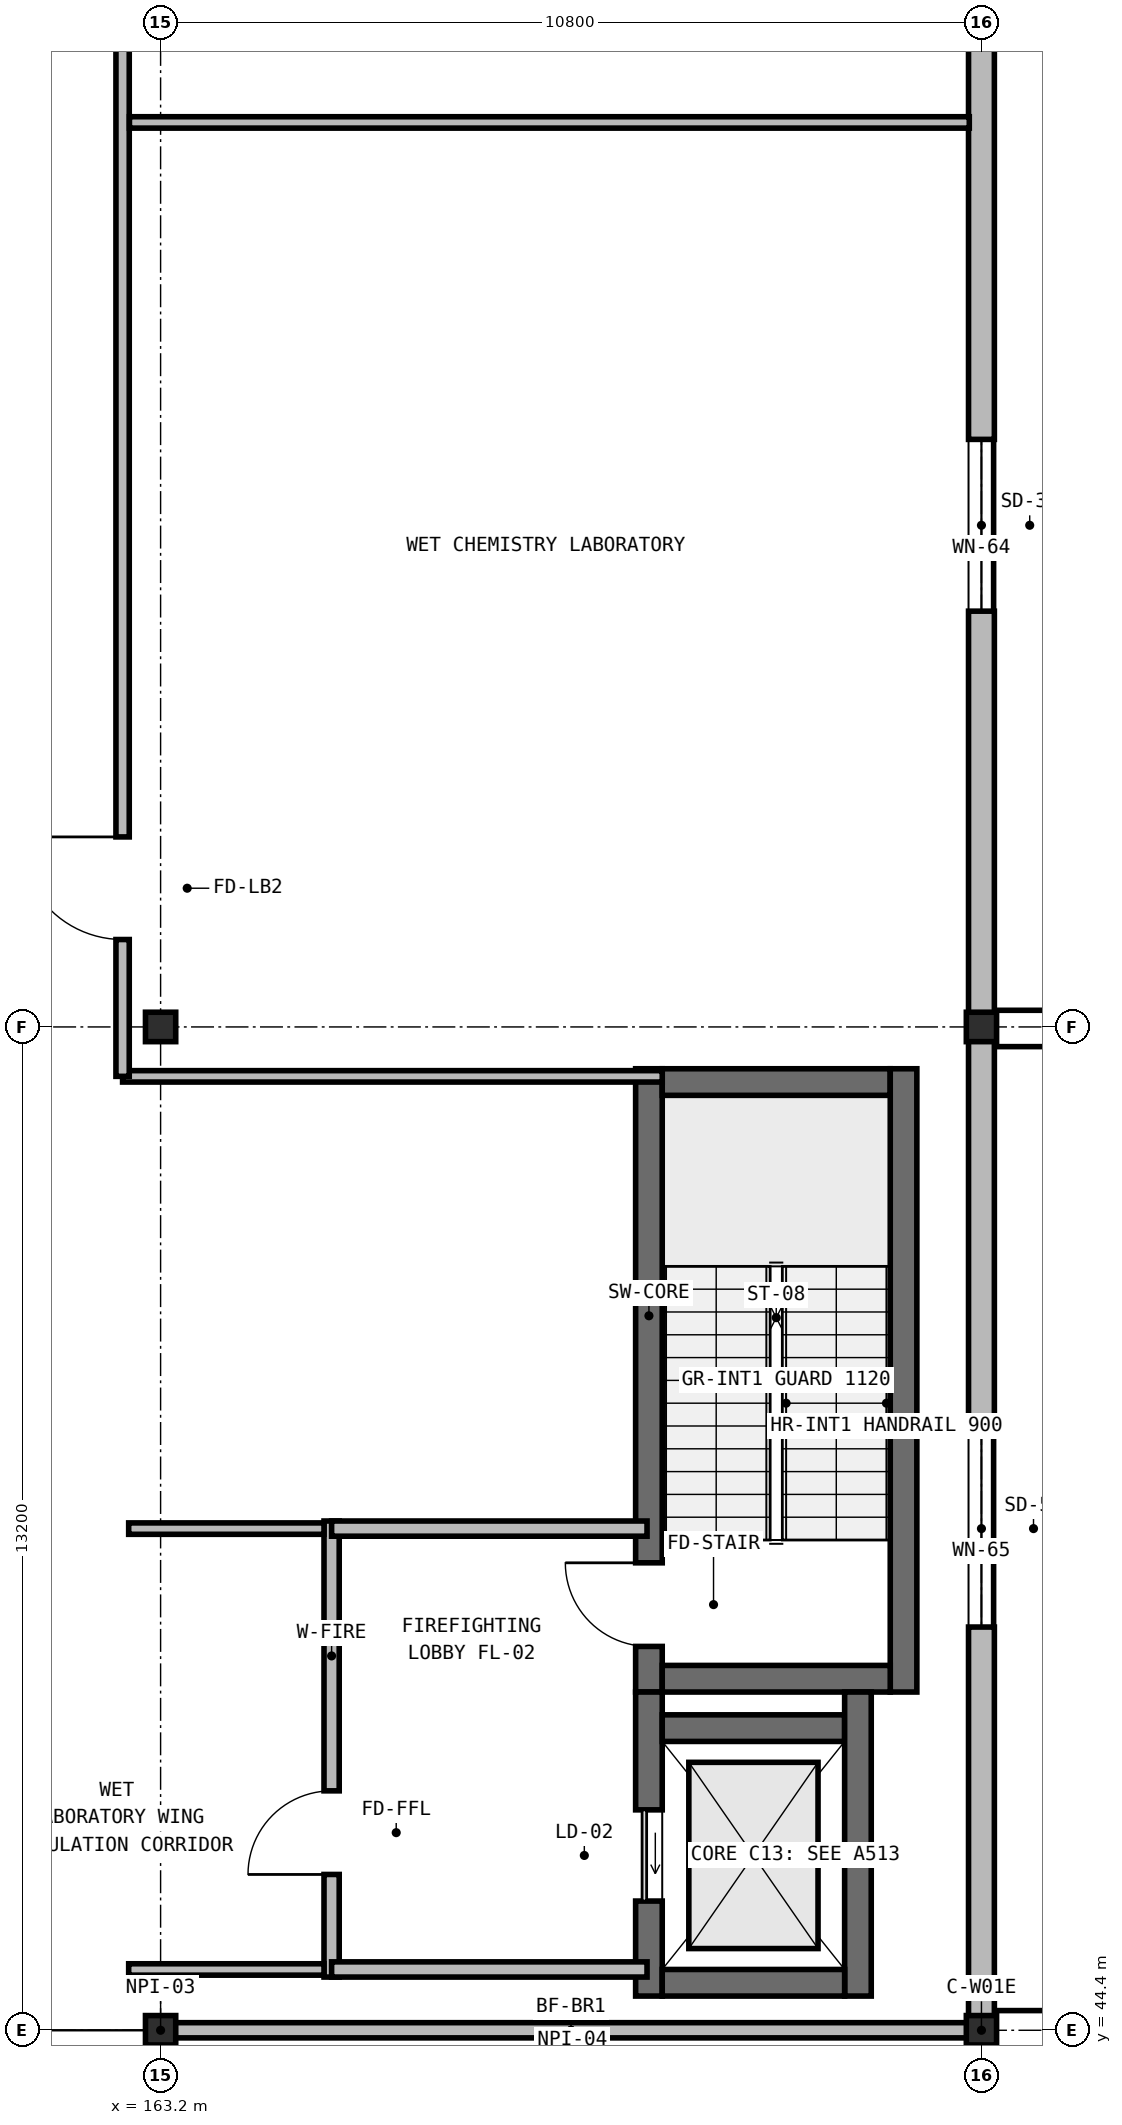
"""IFC4 building model, lengths in metres.
Left out: names, types, materials, properties, quantities, classifications, styles, units other than length and angle.
Written with IfcOpenShell. Run it as: python <this file> out.ifc"""

import sys

from ifc_helpers import new_model, si_unit, direction, frame, frame_2d, origin, origin_2d, place, context, subcontext, project, spatial, rectangle, i_section, extrude, element, fill, save


model = new_model("IFC4")
c1 = context("Model", 3, precision=1e-05, world=origin(), true_north=direction((0.0, 1.0)))
c2 = subcontext(c1, "Body", "Model", "MODEL_VIEW")
j1 = project(units=[si_unit("LENGTHUNIT", "METRE"), si_unit("PLANEANGLEUNIT", "RADIAN")], contexts=[c1])
p1 = place(None, origin())
s1 = spatial("IfcSite", under=j1, at=p1, CompositionType="ELEMENT")
p2 = place(p1, origin())
s2 = spatial("IfcBuilding", under=s1, at=p2, CompositionType="ELEMENT")
p3 = place(p2, frame((0.0, 0.0, 5.25)))
s3 = spatial("IfcBuildingStorey", under=s2, at=p3, CompositionType="ELEMENT", Elevation=5.25)
p4 = place(p3, frame((169.625, 48.85, 0.0), z_axis=(0.0, 0.0, 1.0), x_axis=(0.0, 1.0, 0.0)))
e1 = element("IfcWall", 1, at=p4, inside=s3, PredefinedType="SHEAR", context=c2, shape_type="SweptSolid", body=[
    extrude(rectangle(XDim=8.2, YDim=0.35, at=frame_2d((4.1, 0.0))), origin(), (0.0, 0.0, 1.0), 4.55),
])
p5 = place(p4, frame((0.6, 0.0, 0.0)))
e2 = element("IfcOpeningElement", 2, at=p5, cuts=e1, PredefinedType="OPENING", context=c2, shape_type="SweptSolid", body=[
    extrude(rectangle(XDim=1.1, YDim=2.15, at=frame_2d((0.55, 1.075))), frame((0.0, 0.185, 0.0), z_axis=(0.0, -1.0, 0.0), x_axis=(1.0, 0.0, 0.0)), (0.0, 0.0, 1.0), 0.37),
])
p6 = place(p3, frame((169.8, 56.875, 0.0), z_axis=(0.0, 0.0, 1.0), x_axis=(1.0, 0.0, 0.0)))
e3 = element("IfcWall", 3, at=p6, inside=s3, PredefinedType="SHEAR", context=c2, shape_type="SweptSolid", body=[
    extrude(rectangle(XDim=3.0, YDim=0.35, at=frame_2d((1.5, 0.0))), origin(), (0.0, 0.0, 1.0), 4.55),
])
p7 = place(p3, frame((172.975, 57.05, 0.0), z_axis=(0.0, 0.0, 1.0), x_axis=(0.0, -1.0, 0.0)))
e4 = element("IfcWall", 4, at=p7, inside=s3, PredefinedType="SHEAR", context=c2, shape_type="SweptSolid", body=[
    extrude(rectangle(XDim=8.2, YDim=0.35, at=frame_2d((4.1, 0.0))), origin(), (0.0, 0.0, 1.0), 4.55),
])
p8 = place(p3, frame((172.8, 49.025, 0.0), z_axis=(0.0, 0.0, 1.0), x_axis=(-1.0, 0.0, 0.0)))
e5 = element("IfcWall", 5, at=p8, inside=s3, PredefinedType="SHEAR", context=c2, shape_type="SweptSolid", body=[
    extrude(rectangle(XDim=3.0, YDim=0.35, at=frame_2d((1.5, 0.0))), origin(), (0.0, 0.0, 1.0), 4.55),
])
p9 = place(p3, frame((169.625, 44.85, 0.0), z_axis=(0.0, 0.0, 1.0), x_axis=(0.0, 1.0, 0.0)))
e6 = element("IfcWall", 6, at=p9, inside=s3, PredefinedType="SHEAR", context=c2, shape_type="SweptSolid", body=[
    extrude(rectangle(XDim=4.0, YDim=0.35, at=frame_2d((2.0, 0.0))), origin(), (0.0, 0.0, 1.0), 4.55),
])
p10 = place(p9, frame((1.25, 0.0, 0.0)))
e7 = element("IfcOpeningElement", 7, at=p10, cuts=e6, PredefinedType="OPENING", context=c2, shape_type="SweptSolid", body=[
    extrude(rectangle(XDim=1.2, YDim=2.15, at=frame_2d((0.6, 1.075))), frame((0.0, 0.185, 0.0), z_axis=(0.0, -1.0, 0.0), x_axis=(1.0, 0.0, 0.0)), (0.0, 0.0, 1.0), 0.37),
])
p11 = place(p3, frame((169.8, 48.375, 0.0), z_axis=(0.0, 0.0, 1.0), x_axis=(1.0, 0.0, 0.0)))
e8 = element("IfcWall", 8, at=p11, inside=s3, PredefinedType="SHEAR", context=c2, shape_type="SweptSolid", body=[
    extrude(rectangle(XDim=2.4, YDim=0.35, at=frame_2d((1.2, 0.0))), origin(), (0.0, 0.0, 1.0), 4.55),
])
p12 = place(p3, frame((172.375, 48.85, 0.0), z_axis=(0.0, 0.0, 1.0), x_axis=(0.0, -1.0, 0.0)))
e9 = element("IfcWall", 9, at=p12, inside=s3, PredefinedType="SHEAR", context=c2, shape_type="SweptSolid", body=[
    extrude(rectangle(XDim=4.0, YDim=0.35, at=frame_2d((2.0, 0.0))), origin(), (0.0, 0.0, 1.0), 4.55),
])
p13 = place(p3, frame((172.2, 45.025, 0.0), z_axis=(0.0, 0.0, 1.0), x_axis=(-1.0, 0.0, 0.0)))
e10 = element("IfcWall", 10, at=p13, inside=s3, PredefinedType="SHEAR", context=c2, shape_type="SweptSolid", body=[
    extrude(rectangle(XDim=2.4, YDim=0.35, at=frame_2d((1.2, 0.0))), origin(), (0.0, 0.0, 1.0), 4.55),
])
for number, where, z_axis, x_axis in (
    (11, (163.2, 44.4, 0.0), (0.0, 0.0, 1.0), (1.0, 0.0, 0.0)),
    (12, (163.2, 57.6, 0.0), (0.0, 0.0, 1.0), (1.0, 0.0, 0.0)),
    (13, (174.0, 44.4, 0.0), (0.0, 0.0, 1.0), (1.0, 0.0, 0.0)),
    (14, (174.0, 57.6, 0.0), (0.0, 0.0, 1.0), (1.0, 0.0, 0.0)),
):
    element("IfcColumn", number, at=place(p3, frame(where, z_axis=z_axis, x_axis=x_axis)), inside=s3, PredefinedType="COLUMN", context=c2, shape_type="SweptSolid", body=[
        extrude(i_section(OverallWidth=0.398, OverallDepth=0.387, WebThickness=0.024, FlangeThickness=0.039, at=origin_2d()), origin(), (0.0, 0.0, 1.0), 4.55),
    ])
p14 = place(p3, frame((174.0, 70.796, 0.0), z_axis=(0.0, 0.0, 1.0), x_axis=(0.0, -1.0, 0.0)))
e15 = element("IfcWall", 15, at=p14, inside=s3, PredefinedType="SOLIDWALL", context=c2, shape_type="SweptSolid", body=[
    extrude(rectangle(XDim=13.192, YDim=0.34, at=frame_2d((6.596, 0.0))), origin(), (0.0, 0.0, 1.0), 3.815),
])
p15 = place(p14, frame((5.466, 0.0, 0.95)))
e16 = element("IfcOpeningElement", 16, at=p15, cuts=e15, PredefinedType="OPENING", context=c2, shape_type="SweptSolid", body=[
    extrude(rectangle(XDim=2.26, YDim=1.56, at=frame_2d((1.13, 0.78))), frame((0.0, 0.18, 0.0), z_axis=(0.0, -1.0, 0.0), x_axis=(1.0, 0.0, 0.0)), (0.0, 0.0, 1.0), 0.36),
])
p16 = place(p3, frame((174.0, 57.596, 0.0), z_axis=(0.0, 0.0, 1.0), x_axis=(0.0, -1.0, 0.0)))
e17 = element("IfcWall", 17, at=p16, inside=s3, PredefinedType="SOLIDWALL", context=c2, shape_type="SweptSolid", body=[
    extrude(rectangle(XDim=13.192, YDim=0.34, at=frame_2d((6.596, 0.0))), origin(), (0.0, 0.0, 1.0), 3.815),
])
p17 = place(p16, frame((5.301, 0.0, 0.95)))
e18 = element("IfcOpeningElement", 18, at=p17, cuts=e17, PredefinedType="OPENING", context=c2, shape_type="SweptSolid", body=[
    extrude(rectangle(XDim=2.59, YDim=1.48, at=frame_2d((1.295, 0.74))), frame((0.0, 0.18, 0.0), z_axis=(0.0, -1.0, 0.0), x_axis=(1.0, 0.0, 0.0)), (0.0, 0.0, 1.0), 0.36),
])
p18 = place(p3, frame((174.0, 44.396, 0.0), z_axis=(0.0, 0.0, 1.0), x_axis=(0.0, -1.0, 0.0)))
e19 = element("IfcWall", 19, at=p18, inside=s3, PredefinedType="SOLIDWALL", context=c2, shape_type="SweptSolid", body=[
    extrude(rectangle(XDim=9.592, YDim=0.34, at=frame_2d((4.796, 0.0))), origin(), (0.0, 0.0, 1.0), 3.884),
])
p19 = place(p18, frame((4.216, 0.0, 0.95)))
e20 = element("IfcOpeningElement", 20, at=p19, cuts=e19, PredefinedType="OPENING", context=c2, shape_type="SweptSolid", body=[
    extrude(rectangle(XDim=1.16, YDim=1.4, at=frame_2d((0.58, 0.7))), frame((0.0, 0.18, 0.0), z_axis=(0.0, -1.0, 0.0), x_axis=(1.0, 0.0, 0.0)), (0.0, 0.0, 1.0), 0.36),
])
p20 = place(p3, frame((163.36, 44.4, 0.0), z_axis=(0.0, 0.0, 1.0), x_axis=(1.0, 0.0, 0.0)))
e21 = element("IfcWall", 21, at=p20, inside=s3, PredefinedType="SOLIDWALL", context=c2, shape_type="SweptSolid", body=[
    extrude(rectangle(XDim=10.48, YDim=0.2, at=frame_2d((5.24, 0.0))), origin(), (0.0, 0.0, 1.0), 3.737),
])
p21 = place(p3, frame((165.45, 45.1, 0.0), z_axis=(0.0, 0.0, 1.0), x_axis=(0.0, 1.0, 0.0)))
e22 = element("IfcWall", 22, at=p21, inside=s3, PredefinedType="SOLIDWALL", context=c2, shape_type="SweptSolid", body=[
    extrude(rectangle(XDim=6.0, YDim=0.2, at=frame_2d((3.0, 0.0))), origin(), (0.0, 0.0, 1.0), 4.23),
])
p22 = place(p21, frame((1.35, 0.0, 0.0)))
e23 = element("IfcOpeningElement", 23, at=p22, cuts=e22, PredefinedType="OPENING", context=c2, shape_type="SweptSolid", body=[
    extrude(rectangle(XDim=1.1, YDim=2.15, at=frame_2d((0.55, 1.075))), frame((0.0, 0.11, 0.0), z_axis=(0.0, -1.0, 0.0), x_axis=(1.0, 0.0, 0.0)), (0.0, 0.0, 1.0), 0.22),
])
for number, where, z_axis, x_axis in (
    (24, (165.45, 45.2, 0.0), (0.0, 0.0, 1.0), (1.0, 0.0, 0.0)),
    (25, (165.45, 51.0, 0.0), (0.0, 0.0, 1.0), (1.0, 0.0, 0.0)),
):
    element("IfcWall", number, at=place(p3, frame(where, z_axis=z_axis, x_axis=x_axis)), inside=s3, PredefinedType="SOLIDWALL", context=c2, shape_type="SweptSolid", body=[
        extrude(rectangle(XDim=4.15, YDim=0.2, at=frame_2d((2.075, 0.0))), origin(), (0.0, 0.0, 1.0), 4.23),
    ])
p23 = place(p3, frame((162.7, 56.95, 0.0), z_axis=(0.0, 0.0, 1.0), x_axis=(1.0, 0.0, 0.0)))
e26 = element("IfcWall", 26, at=p23, inside=s3, PredefinedType="PARTITIONING", context=c2, shape_type="SweptSolid", body=[
    extrude(rectangle(XDim=7.1, YDim=0.15, at=frame_2d((3.55, 0.0))), origin(), (0.0, 0.0, 1.0), 4.23),
])
p24 = place(p3, frame((162.7, 56.95, 0.0), z_axis=(0.0, 0.0, 1.0), x_axis=(0.0, 1.0, 0.0)))
e27 = element("IfcWall", 27, at=p24, inside=s3, PredefinedType="PARTITIONING", context=c2, shape_type="SweptSolid", body=[
    extrude(rectangle(XDim=17.8, YDim=0.175, at=frame_2d((8.9, 0.0))), origin(), (0.0, 0.0, 1.0), 4.23),
])
p25 = place(p24, frame((1.8, 0.0, 0.0)))
e28 = element("IfcOpeningElement", 28, at=p25, cuts=e27, PredefinedType="OPENING", context=c2, shape_type="SweptSolid", body=[
    extrude(rectangle(XDim=1.35, YDim=2.2, at=frame_2d((0.675, 1.1))), frame((0.0, 0.097, 0.0), z_axis=(0.0, -1.0, 0.0), x_axis=(1.0, 0.0, 0.0)), (0.0, 0.0, 1.0), 0.195),
])
p26 = place(p24, frame((14.65, 0.0, 0.0)))
e29 = element("IfcOpeningElement", 29, at=p26, cuts=e27, PredefinedType="OPENING", context=c2, shape_type="SweptSolid", body=[
    extrude(rectangle(XDim=1.35, YDim=2.2, at=frame_2d((0.675, 1.1))), frame((0.0, 0.097, 0.0), z_axis=(0.0, -1.0, 0.0), x_axis=(1.0, 0.0, 0.0)), (0.0, 0.0, 1.0), 0.195),
])
p27 = place(p3, frame((162.79, 69.5, 0.0), z_axis=(0.0, 0.0, 1.0), x_axis=(1.0, 0.0, 0.0)))
e30 = element("IfcWall", 30, at=p27, inside=s3, PredefinedType="PARTITIONING", context=c2, shape_type="SweptSolid", body=[
    extrude(rectangle(XDim=11.05, YDim=0.15, at=frame_2d((5.525, 0.0))), origin(), (0.0, 0.0, 1.0), 4.23),
])
for number, where, z_axis, x_axis in (
    (31, (162.78, 45.2, 0.0), (0.0, 0.0, 1.0), (1.0, 0.0, 0.0)),
    (32, (162.78, 51.0, 0.0), (0.0, 0.0, 1.0), (1.0, 0.0, 0.0)),
):
    element("IfcWall", number, at=place(p3, frame(where, z_axis=z_axis, x_axis=x_axis)), inside=s3, PredefinedType="PARTITIONING", context=c2, shape_type="SweptSolid", body=[
        extrude(rectangle(XDim=2.57, YDim=0.15, at=frame_2d((1.285, 0.0))), origin(), (0.0, 0.0, 1.0), 4.23),
    ])
p28 = place(p15, origin())
e33 = element("IfcWindow", 33, at=p28, inside=s3, PartitioningType="SINGLE_PANEL", PredefinedType="WINDOW", context=c2, shape_type="SweptSolid", body=[
    extrude(rectangle(XDim=2.26, YDim=1.56, at=frame_2d((1.13, 0.78))), frame((0.0, 0.03, 0.0), z_axis=(0.0, -1.0, 0.0), x_axis=(1.0, 0.0, 0.0)), (0.0, 0.0, 1.0), 0.06),
])
fill(e16, e33)
p29 = place(p17, origin())
e34 = element("IfcWindow", 34, at=p29, inside=s3, PartitioningType="SINGLE_PANEL", PredefinedType="WINDOW", context=c2, shape_type="SweptSolid", body=[
    extrude(rectangle(XDim=2.59, YDim=1.48, at=frame_2d((1.295, 0.74))), frame((0.0, 0.03, 0.0), z_axis=(0.0, -1.0, 0.0), x_axis=(1.0, 0.0, 0.0)), (0.0, 0.0, 1.0), 0.06),
])
fill(e18, e34)
p30 = place(p5, origin())
e35 = element("IfcDoor", 35, at=p30, inside=s3, OperationType="SINGLE_SWING_RIGHT", PredefinedType="DOOR", context=c2, shape_type="SweptSolid", body=[
    extrude(rectangle(XDim=1.1, YDim=2.15, at=frame_2d((0.55, 1.075))), frame((0.0, 0.025, 0.0), z_axis=(0.0, -1.0, 0.0), x_axis=(1.0, 0.0, 0.0)), (0.0, 0.0, 1.0), 0.05),
])
fill(e2, e35)
p31 = place(p10, origin())
e36 = element("IfcDoor", 36, at=p31, inside=s3, OperationType="SLIDING_TO_LEFT", PredefinedType="USERDEFINED", context=c2, shape_type="SweptSolid", body=[
    extrude(rectangle(XDim=1.2, YDim=2.15, at=frame_2d((0.6, 1.075))), frame((0.0, 0.025, 0.0), z_axis=(0.0, -1.0, 0.0), x_axis=(1.0, 0.0, 0.0)), (0.0, 0.0, 1.0), 0.05),
])
fill(e7, e36)
p32 = place(p22, origin())
e37 = element("IfcDoor", 37, at=p32, inside=s3, OperationType="SINGLE_SWING_LEFT", PredefinedType="DOOR", context=c2, shape_type="SweptSolid", body=[
    extrude(rectangle(XDim=1.1, YDim=2.15, at=frame_2d((0.55, 1.075))), frame((0.0, 0.025, 0.0), z_axis=(0.0, -1.0, 0.0), x_axis=(1.0, 0.0, 0.0)), (0.0, 0.0, 1.0), 0.05),
])
fill(e23, e37)
p33 = place(p25, origin())
e38 = element("IfcDoor", 38, at=p33, inside=s3, OperationType="SINGLE_SWING_RIGHT", PredefinedType="DOOR", context=c2, shape_type="SweptSolid", body=[
    extrude(rectangle(XDim=1.35, YDim=2.2, at=frame_2d((0.675, 1.1))), frame((0.0, 0.025, 0.0), z_axis=(0.0, -1.0, 0.0), x_axis=(1.0, 0.0, 0.0)), (0.0, 0.0, 1.0), 0.05),
])
fill(e28, e38)
save(model, sys.argv[1])
